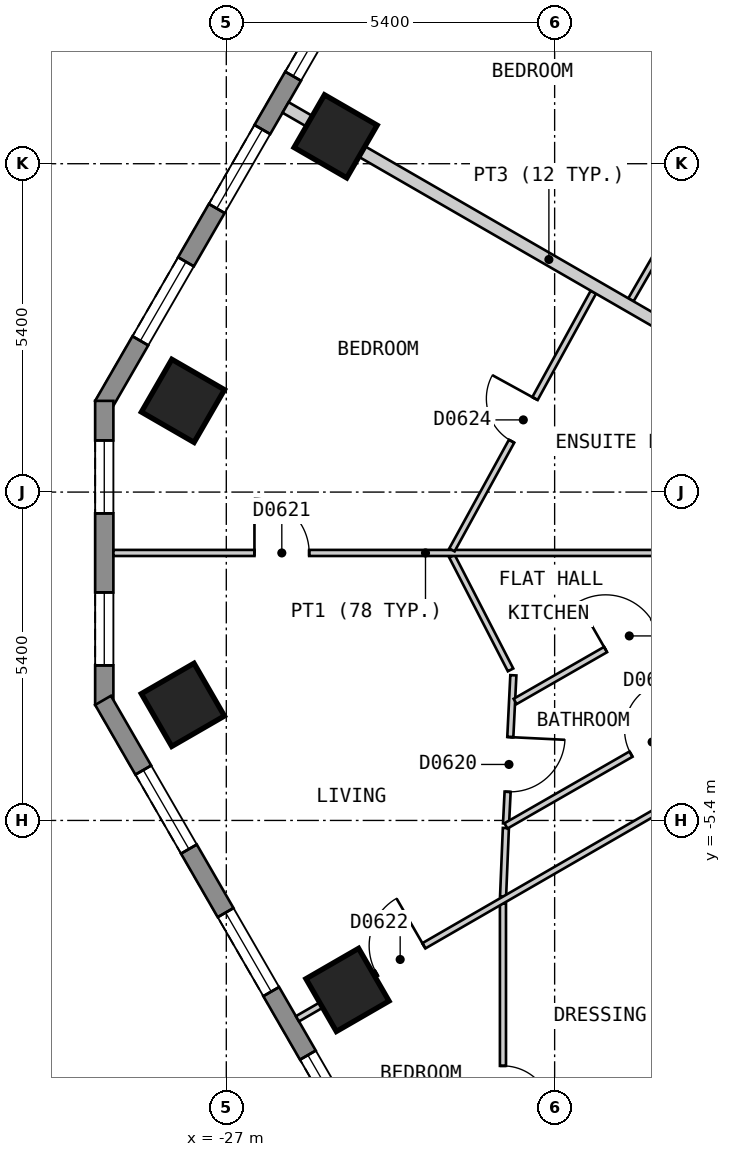
"""IFC4 building model, lengths in metres.
Left out: names, types, materials, properties, quantities, classifications, styles, units other than length and angle.
Written with IfcOpenShell. Run it as: python <this file> out.ifc"""

import sys

from ifc_helpers import new_model, si_unit, direction, frame, frame_2d, origin, origin_2d, place, context, subcontext, project, spatial, polyline, rectangle, outline, extrude, element, fill, save


model = new_model("IFC4")
c1 = context("Model", 3, precision=1e-05, world=origin(), true_north=direction((0.0, 1.0)))
c2 = subcontext(c1, "Body", "Model", "MODEL_VIEW")
j1 = project(units=[si_unit("LENGTHUNIT", "METRE"), si_unit("PLANEANGLEUNIT", "RADIAN")], contexts=[c1])
p1 = place(None, origin())
s1 = spatial("IfcSite", under=j1, at=p1, CompositionType="ELEMENT")
p2 = place(p1, origin())
s2 = spatial("IfcBuilding", under=s1, at=p2, CompositionType="ELEMENT")
p3 = place(p2, frame((0.0, 0.0, 75.0)))
s3 = spatial("IfcBuildingStorey", under=s2, at=p3, CompositionType="ELEMENT", Elevation=75.0)
for number, where, z_axis, x_axis in (
    (1, (-25.202, 5.85, 0.0), (0.0, 0.0, 1.0), (-0.5, -0.866, 0.0)),
    (2, (-27.713, 1.5, 0.0), (0.0, 0.0, 1.0), (-0.5, -0.866, 0.0)),
    (3, (-27.714, -3.499, 0.0), (0.0, 0.0, 1.0), (0.5, -0.866, 0.0)),
    (4, (-25.007, -8.187, 0.0), (0.0, 0.0, 1.0), (0.5, -0.866, 0.0)),
):
    element("IfcColumn", number, at=place(p3, frame(where, z_axis=z_axis, x_axis=x_axis)), inside=s3, PredefinedType="COLUMN", context=c2, shape_type="SweptSolid", body=[
        extrude(rectangle(XDim=1.0, YDim=1.0, at=origin_2d()), origin(), (0.0, 0.0, 1.0), 3.0),
    ])
p4 = place(p3, frame((-15.747, 24.425, 0.0), z_axis=(0.0, 0.0, 1.0), x_axis=(-0.500027479704, -0.866009537788, 0.0)))
e5 = element("IfcWall", 5, at=p4, inside=s3, PredefinedType="SOLIDWALL", context=c2, shape_type="SweptSolid", body=[
    extrude(outline(polyline([(0.0, -0.15), (26.559, -0.15), (26.478, 0.15), (0.08, 0.15), (0.0, -0.15)])), origin(), (0.0, 0.0, 1.0), 2.7),
])
p5 = place(p4, frame((1.227, 0.0, 0.15)))
e6 = element("IfcOpeningElement", 6, at=p5, cuts=e5, PredefinedType="OPENING", context=c2, shape_type="SweptSolid", body=[
    extrude(rectangle(XDim=1.5, YDim=2.1, at=frame_2d((0.75, 1.05))), frame((0.0, 0.16, 0.0), z_axis=(0.0, -1.0, 0.0), x_axis=(1.0, 0.0, 0.0)), (0.0, 0.0, 1.0), 0.32),
])
p6 = place(p4, frame((3.739, 0.0, 0.15)))
e7 = element("IfcOpeningElement", 7, at=p6, cuts=e5, PredefinedType="OPENING", context=c2, shape_type="SweptSolid", body=[
    extrude(rectangle(XDim=1.5, YDim=2.1, at=frame_2d((0.75, 1.05))), frame((0.0, 0.16, 0.0), z_axis=(0.0, -1.0, 0.0), x_axis=(1.0, 0.0, 0.0)), (0.0, 0.0, 1.0), 0.32),
])
p7 = place(p4, frame((6.25, 0.0, 0.15)))
e8 = element("IfcOpeningElement", 8, at=p7, cuts=e5, PredefinedType="OPENING", context=c2, shape_type="SweptSolid", body=[
    extrude(rectangle(XDim=1.5, YDim=2.1, at=frame_2d((0.75, 1.05))), frame((0.0, 0.16, 0.0), z_axis=(0.0, -1.0, 0.0), x_axis=(1.0, 0.0, 0.0)), (0.0, 0.0, 1.0), 0.32),
])
p8 = place(p4, frame((8.761, 0.0, 0.15)))
e9 = element("IfcOpeningElement", 9, at=p8, cuts=e5, PredefinedType="OPENING", context=c2, shape_type="SweptSolid", body=[
    extrude(rectangle(XDim=1.5, YDim=2.1, at=frame_2d((0.75, 1.05))), frame((0.0, 0.16, 0.0), z_axis=(0.0, -1.0, 0.0), x_axis=(1.0, 0.0, 0.0)), (0.0, 0.0, 1.0), 0.32),
])
p9 = place(p4, frame((11.273, 0.0, 0.15)))
e10 = element("IfcOpeningElement", 10, at=p9, cuts=e5, PredefinedType="OPENING", context=c2, shape_type="SweptSolid", body=[
    extrude(rectangle(XDim=1.5, YDim=2.1, at=frame_2d((0.75, 1.05))), frame((0.0, 0.16, 0.0), z_axis=(0.0, -1.0, 0.0), x_axis=(1.0, 0.0, 0.0)), (0.0, 0.0, 1.0), 0.32),
])
p10 = place(p4, frame((13.785, 0.0, 0.15)))
e11 = element("IfcOpeningElement", 11, at=p10, cuts=e5, PredefinedType="OPENING", context=c2, shape_type="SweptSolid", body=[
    extrude(rectangle(XDim=1.5, YDim=2.1, at=frame_2d((0.75, 1.05))), frame((0.0, 0.16, 0.0), z_axis=(0.0, -1.0, 0.0), x_axis=(1.0, 0.0, 0.0)), (0.0, 0.0, 1.0), 0.32),
])
p11 = place(p4, frame((16.296, 0.0, 0.15)))
e12 = element("IfcOpeningElement", 12, at=p11, cuts=e5, PredefinedType="OPENING", context=c2, shape_type="SweptSolid", body=[
    extrude(rectangle(XDim=1.5, YDim=2.1, at=frame_2d((0.75, 1.05))), frame((0.0, 0.16, 0.0), z_axis=(0.0, -1.0, 0.0), x_axis=(1.0, 0.0, 0.0)), (0.0, 0.0, 1.0), 0.32),
])
p12 = place(p4, frame((18.807, 0.0, 0.15)))
e13 = element("IfcOpeningElement", 13, at=p12, cuts=e5, PredefinedType="OPENING", context=c2, shape_type="SweptSolid", body=[
    extrude(rectangle(XDim=1.5, YDim=2.1, at=frame_2d((0.75, 1.05))), frame((0.0, 0.16, 0.0), z_axis=(0.0, -1.0, 0.0), x_axis=(1.0, 0.0, 0.0)), (0.0, 0.0, 1.0), 0.32),
])
p13 = place(p4, frame((21.319, 0.0, 0.15)))
e14 = element("IfcOpeningElement", 14, at=p13, cuts=e5, PredefinedType="OPENING", context=c2, shape_type="SweptSolid", body=[
    extrude(rectangle(XDim=1.5, YDim=2.1, at=frame_2d((0.75, 1.05))), frame((0.0, 0.16, 0.0), z_axis=(0.0, -1.0, 0.0), x_axis=(1.0, 0.0, 0.0)), (0.0, 0.0, 1.0), 0.32),
])
p14 = place(p4, frame((23.831, 0.0, 0.15)))
e15 = element("IfcOpeningElement", 15, at=p14, cuts=e5, PredefinedType="OPENING", context=c2, shape_type="SweptSolid", body=[
    extrude(rectangle(XDim=1.5, YDim=2.1, at=frame_2d((0.75, 1.05))), frame((0.0, 0.16, 0.0), z_axis=(0.0, -1.0, 0.0), x_axis=(1.0, 0.0, 0.0)), (0.0, 0.0, 1.0), 0.32),
])
p15 = place(p3, frame((-29.007, 1.5, 0.0), z_axis=(0.0, 0.0, 1.0), x_axis=(0.0, -1.0, 0.0)))
e16 = element("IfcWall", 16, at=p15, inside=s3, PredefinedType="SOLIDWALL", context=c2, shape_type="SweptSolid", body=[
    extrude(outline(polyline([(0.0, -0.15), (5.0, -0.15), (4.92, 0.15), (0.08, 0.15), (0.0, -0.15)])), origin(), (0.0, 0.0, 1.0), 2.7),
])
p16 = place(p15, frame((0.65, 0.0, 0.15)))
e17 = element("IfcOpeningElement", 17, at=p16, cuts=e16, PredefinedType="OPENING", context=c2, shape_type="SweptSolid", body=[
    extrude(rectangle(XDim=1.2, YDim=2.1, at=frame_2d((0.6, 1.05))), frame((0.0, 0.16, 0.0), z_axis=(0.0, -1.0, 0.0), x_axis=(1.0, 0.0, 0.0)), (0.0, 0.0, 1.0), 0.32),
])
p17 = place(p15, frame((3.15, 0.0, 0.15)))
e18 = element("IfcOpeningElement", 18, at=p17, cuts=e16, PredefinedType="OPENING", context=c2, shape_type="SweptSolid", body=[
    extrude(rectangle(XDim=1.2, YDim=2.1, at=frame_2d((0.6, 1.05))), frame((0.0, 0.16, 0.0), z_axis=(0.0, -1.0, 0.0), x_axis=(1.0, 0.0, 0.0)), (0.0, 0.0, 1.0), 0.32),
])
p18 = place(p3, frame((-29.027, -3.425, 0.0), z_axis=(0.0, 0.0, 1.0), x_axis=(0.500035407905, -0.866004960056, 0.0)))
e19 = element("IfcWall", 19, at=p18, inside=s3, PredefinedType="SOLIDWALL", context=c2, shape_type="SweptSolid", body=[
    extrude(outline(polyline([(0.0, -0.15), (23.094, -0.15), (23.014, 0.15), (0.08, 0.15), (0.0, -0.15)])), origin(), (0.0, 0.0, 1.0), 2.7),
])
p19 = place(p18, frame((1.324, 0.0, 0.15)))
e20 = element("IfcOpeningElement", 20, at=p19, cuts=e19, PredefinedType="OPENING", context=c2, shape_type="SweptSolid", body=[
    extrude(rectangle(XDim=1.5, YDim=2.1, at=frame_2d((0.75, 1.05))), frame((0.0, 0.16, 0.0), z_axis=(0.0, -1.0, 0.0), x_axis=(1.0, 0.0, 0.0)), (0.0, 0.0, 1.0), 0.32),
])
p20 = place(p18, frame((4.031, 0.0, 0.15)))
e21 = element("IfcOpeningElement", 21, at=p20, cuts=e19, PredefinedType="OPENING", context=c2, shape_type="SweptSolid", body=[
    extrude(rectangle(XDim=1.5, YDim=2.1, at=frame_2d((0.75, 1.05))), frame((0.0, 0.16, 0.0), z_axis=(0.0, -1.0, 0.0), x_axis=(1.0, 0.0, 0.0)), (0.0, 0.0, 1.0), 0.32),
])
p21 = place(p18, frame((6.737, 0.0, 0.15)))
e22 = element("IfcOpeningElement", 22, at=p21, cuts=e19, PredefinedType="OPENING", context=c2, shape_type="SweptSolid", body=[
    extrude(rectangle(XDim=1.5, YDim=2.1, at=frame_2d((0.75, 1.05))), frame((0.0, 0.16, 0.0), z_axis=(0.0, -1.0, 0.0), x_axis=(1.0, 0.0, 0.0)), (0.0, 0.0, 1.0), 0.32),
])
p22 = place(p18, frame((9.444, 0.0, 0.15)))
e23 = element("IfcOpeningElement", 23, at=p22, cuts=e19, PredefinedType="OPENING", context=c2, shape_type="SweptSolid", body=[
    extrude(rectangle(XDim=1.5, YDim=2.1, at=frame_2d((0.75, 1.05))), frame((0.0, 0.16, 0.0), z_axis=(0.0, -1.0, 0.0), x_axis=(1.0, 0.0, 0.0)), (0.0, 0.0, 1.0), 0.32),
])
p23 = place(p18, frame((12.151, 0.0, 0.15)))
e24 = element("IfcOpeningElement", 24, at=p23, cuts=e19, PredefinedType="OPENING", context=c2, shape_type="SweptSolid", body=[
    extrude(rectangle(XDim=1.5, YDim=2.1, at=frame_2d((0.75, 1.05))), frame((0.0, 0.16, 0.0), z_axis=(0.0, -1.0, 0.0), x_axis=(1.0, 0.0, 0.0)), (0.0, 0.0, 1.0), 0.32),
])
p24 = place(p18, frame((14.857, 0.0, 0.15)))
e25 = element("IfcOpeningElement", 25, at=p24, cuts=e19, PredefinedType="OPENING", context=c2, shape_type="SweptSolid", body=[
    extrude(rectangle(XDim=1.5, YDim=2.1, at=frame_2d((0.75, 1.05))), frame((0.0, 0.16, 0.0), z_axis=(0.0, -1.0, 0.0), x_axis=(1.0, 0.0, 0.0)), (0.0, 0.0, 1.0), 0.32),
])
p25 = place(p18, frame((17.564, 0.0, 0.15)))
e26 = element("IfcOpeningElement", 26, at=p25, cuts=e19, PredefinedType="OPENING", context=c2, shape_type="SweptSolid", body=[
    extrude(rectangle(XDim=1.5, YDim=2.1, at=frame_2d((0.75, 1.05))), frame((0.0, 0.16, 0.0), z_axis=(0.0, -1.0, 0.0), x_axis=(1.0, 0.0, 0.0)), (0.0, 0.0, 1.0), 0.32),
])
p26 = place(p18, frame((20.27, 0.0, 0.15)))
e27 = element("IfcOpeningElement", 27, at=p26, cuts=e19, PredefinedType="OPENING", context=c2, shape_type="SweptSolid", body=[
    extrude(rectangle(XDim=1.5, YDim=2.1, at=frame_2d((0.75, 1.05))), frame((0.0, 0.16, 0.0), z_axis=(0.0, -1.0, 0.0), x_axis=(1.0, 0.0, 0.0)), (0.0, 0.0, 1.0), 0.32),
])
p27 = place(p3, frame((-23.289, -1.054, 0.0), z_axis=(0.0, 0.0, 1.0), x_axis=(0.458226112305, -0.888835659726, 0.0)))
e28 = element("IfcWall", 28, at=p27, inside=s3, PredefinedType="PARTITIONING", context=c2, shape_type="SweptSolid", body=[
    extrude(rectangle(XDim=2.104, YDim=0.1, at=frame_2d((1.052, 0.0))), origin(), (0.0, 0.0, 1.0), 2.7),
])
p28 = place(p3, frame((-23.513, 10.675, 0.0), z_axis=(0.0, 0.0, 1.0), x_axis=(0.866041268327, -0.499972520799, 0.0)))
e29 = element("IfcWall", 29, at=p28, inside=s3, PredefinedType="PARTITIONING", context=c2, shape_type="SweptSolid", body=[
    extrude(rectangle(XDim=10.0, YDim=0.1, at=frame_2d((5.0, 0.0))), origin(), (0.0, 0.0, 1.0), 2.7),
])
p29 = place(p28, frame((4.325, 0.0, 0.0)))
e30 = element("IfcOpeningElement", 30, at=p29, cuts=e29, PredefinedType="OPENING", context=c2, shape_type="SweptSolid", body=[
    extrude(rectangle(XDim=0.9, YDim=2.1, at=frame_2d((0.45, 1.05))), frame((0.0, 0.06, 0.0), z_axis=(0.0, -1.0, 0.0), x_axis=(1.0, 0.0, 0.0)), (0.0, 0.0, 1.0), 0.12),
])
p30 = place(p3, frame((-28.857, -1.001, 0.0), z_axis=(0.0, 0.0, 1.0), x_axis=(1.0, 0.0, 0.0)))
e31 = element("IfcWall", 31, at=p30, inside=s3, PredefinedType="PARTITIONING", context=c2, shape_type="SweptSolid", body=[
    extrude(rectangle(XDim=10.266, YDim=0.1, at=frame_2d((5.133, 0.0))), origin(), (0.0, 0.0, 1.0), 2.7),
])
p31 = place(p30, frame((2.32, 0.0, 0.0)))
e32 = element("IfcOpeningElement", 32, at=p31, cuts=e31, PredefinedType="OPENING", context=c2, shape_type="SweptSolid", body=[
    extrude(rectangle(XDim=0.9, YDim=2.1, at=frame_2d((0.45, 1.05))), frame((0.0, 0.06, 0.0), z_axis=(0.0, -1.0, 0.0), x_axis=(1.0, 0.0, 0.0)), (0.0, 0.0, 1.0), 0.12),
])
p32 = place(p3, frame((-20.345, 3.162, 0.0), z_axis=(0.0, 0.0, 1.0), x_axis=(0.499943653708, 0.866057932887, 0.0)))
e33 = element("IfcWall", 33, at=p32, inside=s3, PredefinedType="PARTITIONING", context=c2, shape_type="SweptSolid", body=[
    extrude(rectangle(XDim=4.873, YDim=0.1, at=frame_2d((2.436, 0.0))), origin(), (0.0, 0.0, 1.0), 2.7),
])
p33 = place(p32, frame((2.011, 0.0, 0.0)))
e34 = element("IfcOpeningElement", 34, at=p33, cuts=e33, PredefinedType="OPENING", context=c2, shape_type="SweptSolid", body=[
    extrude(rectangle(XDim=0.8, YDim=2.1, at=frame_2d((0.4, 1.05))), frame((0.0, 0.06, 0.0), z_axis=(0.0, -1.0, 0.0), x_axis=(1.0, 0.0, 0.0)), (0.0, 0.0, 1.0), 0.12),
])
p34 = place(p3, frame((-23.289, -0.951, 0.0), z_axis=(0.0, 0.0, 1.0), x_axis=(0.481164463081, 0.876630343684, 0.0)))
e35 = element("IfcWall", 35, at=p34, inside=s3, PredefinedType="PARTITIONING", context=c2, shape_type="SweptSolid", body=[
    extrude(rectangle(XDim=4.834, YDim=0.1, at=frame_2d((2.417, 0.0))), origin(), (0.0, 0.0, 1.0), 2.7),
])
p35 = place(p34, frame((2.039, 0.0, 0.0)))
e36 = element("IfcOpeningElement", 36, at=p35, cuts=e35, PredefinedType="OPENING", context=c2, shape_type="SweptSolid", body=[
    extrude(rectangle(XDim=0.8, YDim=2.1, at=frame_2d((0.4, 1.05))), frame((0.0, 0.06, 0.0), z_axis=(0.0, -1.0, 0.0), x_axis=(1.0, 0.0, 0.0)), (0.0, 0.0, 1.0), 0.12),
])
p36 = place(p3, frame((-22.399, -5.45, 0.0), z_axis=(0.0, 0.0, 1.0), x_axis=(0.049129140995, 0.998792434646, 0.0)))
e37 = element("IfcWall", 37, at=p36, inside=s3, PredefinedType="PARTITIONING", context=c2, shape_type="SweptSolid", body=[
    extrude(rectangle(XDim=2.44, YDim=0.1, at=frame_2d((1.22, 0.0))), origin(), (0.0, 0.0, 1.0), 2.7),
])
p37 = place(p36, frame((0.522, 0.0, 0.0)))
e38 = element("IfcOpeningElement", 38, at=p37, cuts=e37, PredefinedType="OPENING", context=c2, shape_type="SweptSolid", body=[
    extrude(rectangle(XDim=0.9, YDim=2.1, at=frame_2d((0.45, 1.05))), frame((0.0, 0.06, 0.0), z_axis=(0.0, -1.0, 0.0), x_axis=(1.0, 0.0, 0.0)), (0.0, 0.0, 1.0), 0.12),
])
p38 = place(p3, frame((-22.448, -6.651, 0.0), z_axis=(0.0, 0.0, 1.0), x_axis=(0.040729401597, 0.99917021365, 0.0)))
e39 = element("IfcWall", 39, at=p38, inside=s3, PredefinedType="PARTITIONING", context=c2, shape_type="SweptSolid", body=[
    extrude(rectangle(XDim=1.127, YDim=0.1, at=frame_2d((0.563, 0.0))), origin(), (0.0, 0.0, 1.0), 2.7),
])
p39 = place(p3, frame((-22.45, -12.846, 0.0), z_axis=(0.0, 0.0, 1.0), x_axis=(0.0, 1.0, 0.0)))
e40 = element("IfcWall", 40, at=p39, inside=s3, PredefinedType="PARTITIONING", context=c2, shape_type="SweptSolid", body=[
    extrude(rectangle(XDim=6.078, YDim=0.1, at=frame_2d((3.039, 0.0))), origin(), (0.0, 0.0, 1.0), 2.7),
])
p40 = place(p39, frame((2.61, 0.0, 0.0)))
e41 = element("IfcOpeningElement", 41, at=p40, cuts=e40, PredefinedType="OPENING", context=c2, shape_type="SweptSolid", body=[
    extrude(rectangle(XDim=0.8, YDim=2.1, at=frame_2d((0.4, 1.05))), frame((0.0, 0.06, 0.0), z_axis=(0.0, -1.0, 0.0), x_axis=(1.0, 0.0, 0.0)), (0.0, 0.0, 1.0), 0.12),
])
p41 = place(p3, frame((-25.83, -8.662, 0.0), z_axis=(0.0, 0.0, 1.0), x_axis=(0.866022959057, 0.500004234368, 0.0)))
e42 = element("IfcWall", 42, at=p41, inside=s3, PredefinedType="PARTITIONING", context=c2, shape_type="SweptSolid", body=[
    extrude(rectangle(XDim=10.0, YDim=0.1, at=frame_2d((5.0, 0.0))), origin(), (0.0, 0.0, 1.0), 2.7),
])
p42 = place(p41, frame((1.501, 0.0, 0.0)))
e43 = element("IfcOpeningElement", 43, at=p42, cuts=e42, PredefinedType="OPENING", context=c2, shape_type="SweptSolid", body=[
    extrude(rectangle(XDim=0.9, YDim=2.1, at=frame_2d((0.45, 1.05))), frame((0.0, 0.06, 0.0), z_axis=(0.0, -1.0, 0.0), x_axis=(1.0, 0.0, 0.0)), (0.0, 0.0, 1.0), 0.12),
])
p43 = place(p3, frame((-22.401, -5.49, 0.0), z_axis=(0.0, 0.0, 1.0), x_axis=(0.867314404256, 0.497760709749, 0.0)))
e44 = element("IfcWall", 44, at=p43, inside=s3, PredefinedType="PARTITIONING", context=c2, shape_type="SweptSolid", body=[
    extrude(rectangle(XDim=5.444, YDim=0.1, at=frame_2d((2.722, 0.0))), origin(), (0.0, 0.0, 1.0), 2.7),
])
p44 = place(p43, frame((2.372, 0.0, 0.0)))
e45 = element("IfcOpeningElement", 45, at=p44, cuts=e44, PredefinedType="OPENING", context=c2, shape_type="SweptSolid", body=[
    extrude(rectangle(XDim=0.8, YDim=2.1, at=frame_2d((0.4, 1.05))), frame((0.0, 0.06, 0.0), z_axis=(0.0, -1.0, 0.0), x_axis=(1.0, 0.0, 0.0)), (0.0, 0.0, 1.0), 0.12),
])
p45 = place(p3, frame((-22.25, -3.443, 0.0), z_axis=(0.0, 0.0, 1.0), x_axis=(0.867362741349, 0.497676476156, 0.0)))
e46 = element("IfcWall", 46, at=p45, inside=s3, PredefinedType="PARTITIONING", context=c2, shape_type="SweptSolid", body=[
    extrude(rectangle(XDim=4.29, YDim=0.1, at=frame_2d((2.145, 0.0))), origin(), (0.0, 0.0, 1.0), 2.7),
])
p46 = place(p45, frame((1.715, 0.0, 0.0)))
e47 = element("IfcOpeningElement", 47, at=p46, cuts=e46, PredefinedType="OPENING", context=c2, shape_type="SweptSolid", body=[
    extrude(rectangle(XDim=0.9, YDim=2.1, at=frame_2d((0.45, 1.05))), frame((0.0, 0.06, 0.0), z_axis=(0.0, -1.0, 0.0), x_axis=(1.0, 0.0, 0.0)), (0.0, 0.0, 1.0), 0.12),
])
p47 = place(p3, frame((-26.025, 6.325, 0.0), z_axis=(0.0, 0.0, 1.0), x_axis=(0.866041268327, -0.499972520799, 0.0)))
e48 = element("IfcWall", 48, at=p47, inside=s3, PredefinedType="PARTITIONING", context=c2, shape_type="SweptSolid", body=[
    extrude(rectangle(XDim=10.0, YDim=0.2, at=frame_2d((5.0, 0.0))), origin(), (0.0, 0.0, 1.0), 2.7),
])
p48 = place(p12, origin())
e49 = element("IfcWindow", 49, at=p48, inside=s3, PartitioningType="SINGLE_PANEL", PredefinedType="WINDOW", context=c2, shape_type="SweptSolid", body=[
    extrude(rectangle(XDim=1.5, YDim=2.1, at=frame_2d((0.75, 1.05))), frame((0.0, 0.03, 0.0), z_axis=(0.0, -1.0, 0.0), x_axis=(1.0, 0.0, 0.0)), (0.0, 0.0, 1.0), 0.06),
])
fill(e13, e49)
p49 = place(p13, origin())
e50 = element("IfcWindow", 50, at=p49, inside=s3, PartitioningType="SINGLE_PANEL", PredefinedType="WINDOW", context=c2, shape_type="SweptSolid", body=[
    extrude(rectangle(XDim=1.5, YDim=2.1, at=frame_2d((0.75, 1.05))), frame((0.0, 0.03, 0.0), z_axis=(0.0, -1.0, 0.0), x_axis=(1.0, 0.0, 0.0)), (0.0, 0.0, 1.0), 0.06),
])
fill(e14, e50)
p50 = place(p14, origin())
e51 = element("IfcWindow", 51, at=p50, inside=s3, PartitioningType="SINGLE_PANEL", PredefinedType="WINDOW", context=c2, shape_type="SweptSolid", body=[
    extrude(rectangle(XDim=1.5, YDim=2.1, at=frame_2d((0.75, 1.05))), frame((0.0, 0.03, 0.0), z_axis=(0.0, -1.0, 0.0), x_axis=(1.0, 0.0, 0.0)), (0.0, 0.0, 1.0), 0.06),
])
fill(e15, e51)
p51 = place(p16, origin())
e52 = element("IfcWindow", 52, at=p51, inside=s3, PartitioningType="SINGLE_PANEL", PredefinedType="WINDOW", context=c2, shape_type="SweptSolid", body=[
    extrude(rectangle(XDim=1.2, YDim=2.1, at=frame_2d((0.6, 1.05))), frame((0.0, 0.03, 0.0), z_axis=(0.0, -1.0, 0.0), x_axis=(1.0, 0.0, 0.0)), (0.0, 0.0, 1.0), 0.06),
])
fill(e17, e52)
p52 = place(p17, origin())
e53 = element("IfcWindow", 53, at=p52, inside=s3, PartitioningType="SINGLE_PANEL", PredefinedType="WINDOW", context=c2, shape_type="SweptSolid", body=[
    extrude(rectangle(XDim=1.2, YDim=2.1, at=frame_2d((0.6, 1.05))), frame((0.0, 0.03, 0.0), z_axis=(0.0, -1.0, 0.0), x_axis=(1.0, 0.0, 0.0)), (0.0, 0.0, 1.0), 0.06),
])
fill(e18, e53)
p53 = place(p19, origin())
e54 = element("IfcWindow", 54, at=p53, inside=s3, PartitioningType="SINGLE_PANEL", PredefinedType="WINDOW", context=c2, shape_type="SweptSolid", body=[
    extrude(rectangle(XDim=1.5, YDim=2.1, at=frame_2d((0.75, 1.05))), frame((0.0, 0.03, 0.0), z_axis=(0.0, -1.0, 0.0), x_axis=(1.0, 0.0, 0.0)), (0.0, 0.0, 1.0), 0.06),
])
fill(e20, e54)
p54 = place(p20, origin())
e55 = element("IfcWindow", 55, at=p54, inside=s3, PartitioningType="SINGLE_PANEL", PredefinedType="WINDOW", context=c2, shape_type="SweptSolid", body=[
    extrude(rectangle(XDim=1.5, YDim=2.1, at=frame_2d((0.75, 1.05))), frame((0.0, 0.03, 0.0), z_axis=(0.0, -1.0, 0.0), x_axis=(1.0, 0.0, 0.0)), (0.0, 0.0, 1.0), 0.06),
])
fill(e21, e55)
p55 = place(p21, origin())
e56 = element("IfcWindow", 56, at=p55, inside=s3, PartitioningType="SINGLE_PANEL", PredefinedType="WINDOW", context=c2, shape_type="SweptSolid", body=[
    extrude(rectangle(XDim=1.5, YDim=2.1, at=frame_2d((0.75, 1.05))), frame((0.0, 0.03, 0.0), z_axis=(0.0, -1.0, 0.0), x_axis=(1.0, 0.0, 0.0)), (0.0, 0.0, 1.0), 0.06),
])
fill(e22, e56)
p56 = place(p44, origin())
e57 = element("IfcDoor", 57, at=p56, inside=s3, OperationType="SINGLE_SWING_RIGHT", PredefinedType="DOOR", context=c2, shape_type="SweptSolid", body=[
    extrude(rectangle(XDim=0.8, YDim=2.1, at=frame_2d((0.4, 1.05))), frame((0.0, 0.025, 0.0), z_axis=(0.0, -1.0, 0.0), x_axis=(1.0, 0.0, 0.0)), (0.0, 0.0, 1.0), 0.05),
])
fill(e45, e57)
p57 = place(p46, origin())
e58 = element("IfcDoor", 58, at=p57, inside=s3, OperationType="SINGLE_SWING_LEFT", PredefinedType="DOOR", context=c2, shape_type="SweptSolid", body=[
    extrude(rectangle(XDim=0.9, YDim=2.1, at=frame_2d((0.45, 1.05))), frame((0.0, 0.025, 0.0), z_axis=(0.0, -1.0, 0.0), x_axis=(1.0, 0.0, 0.0)), (0.0, 0.0, 1.0), 0.05),
])
fill(e47, e58)
p58 = place(p37, origin())
e59 = element("IfcDoor", 59, at=p58, inside=s3, OperationType="SINGLE_SWING_RIGHT", PredefinedType="DOOR", context=c2, shape_type="SweptSolid", body=[
    extrude(rectangle(XDim=0.9, YDim=2.1, at=frame_2d((0.45, 1.05))), frame((0.0, 0.025, 0.0), z_axis=(0.0, -1.0, 0.0), x_axis=(1.0, 0.0, 0.0)), (0.0, 0.0, 1.0), 0.05),
])
fill(e38, e59)
p59 = place(p31, origin())
e60 = element("IfcDoor", 60, at=p59, inside=s3, OperationType="SINGLE_SWING_LEFT", PredefinedType="DOOR", context=c2, shape_type="SweptSolid", body=[
    extrude(rectangle(XDim=0.9, YDim=2.1, at=frame_2d((0.45, 1.05))), frame((0.0, 0.025, 0.0), z_axis=(0.0, -1.0, 0.0), x_axis=(1.0, 0.0, 0.0)), (0.0, 0.0, 1.0), 0.05),
])
fill(e32, e60)
p60 = place(p42, origin())
e61 = element("IfcDoor", 61, at=p60, inside=s3, OperationType="SINGLE_SWING_RIGHT", PredefinedType="DOOR", context=c2, shape_type="SweptSolid", body=[
    extrude(rectangle(XDim=0.9, YDim=2.1, at=frame_2d((0.45, 1.05))), frame((0.0, 0.025, 0.0), z_axis=(0.0, -1.0, 0.0), x_axis=(1.0, 0.0, 0.0)), (0.0, 0.0, 1.0), 0.05),
])
fill(e43, e61)
p61 = place(p40, origin())
e62 = element("IfcDoor", 62, at=p61, inside=s3, OperationType="SINGLE_SWING_LEFT", PredefinedType="DOOR", context=c2, shape_type="SweptSolid", body=[
    extrude(rectangle(XDim=0.8, YDim=2.1, at=frame_2d((0.4, 1.05))), frame((0.0, 0.025, 0.0), z_axis=(0.0, -1.0, 0.0), x_axis=(1.0, 0.0, 0.0)), (0.0, 0.0, 1.0), 0.05),
])
fill(e41, e62)
p62 = place(p35, origin())
e63 = element("IfcDoor", 63, at=p62, inside=s3, OperationType="SINGLE_SWING_RIGHT", PredefinedType="DOOR", context=c2, shape_type="SweptSolid", body=[
    extrude(rectangle(XDim=0.8, YDim=2.1, at=frame_2d((0.4, 1.05))), frame((0.0, 0.025, 0.0), z_axis=(0.0, -1.0, 0.0), x_axis=(1.0, 0.0, 0.0)), (0.0, 0.0, 1.0), 0.05),
])
fill(e36, e63)
save(model, sys.argv[1])
